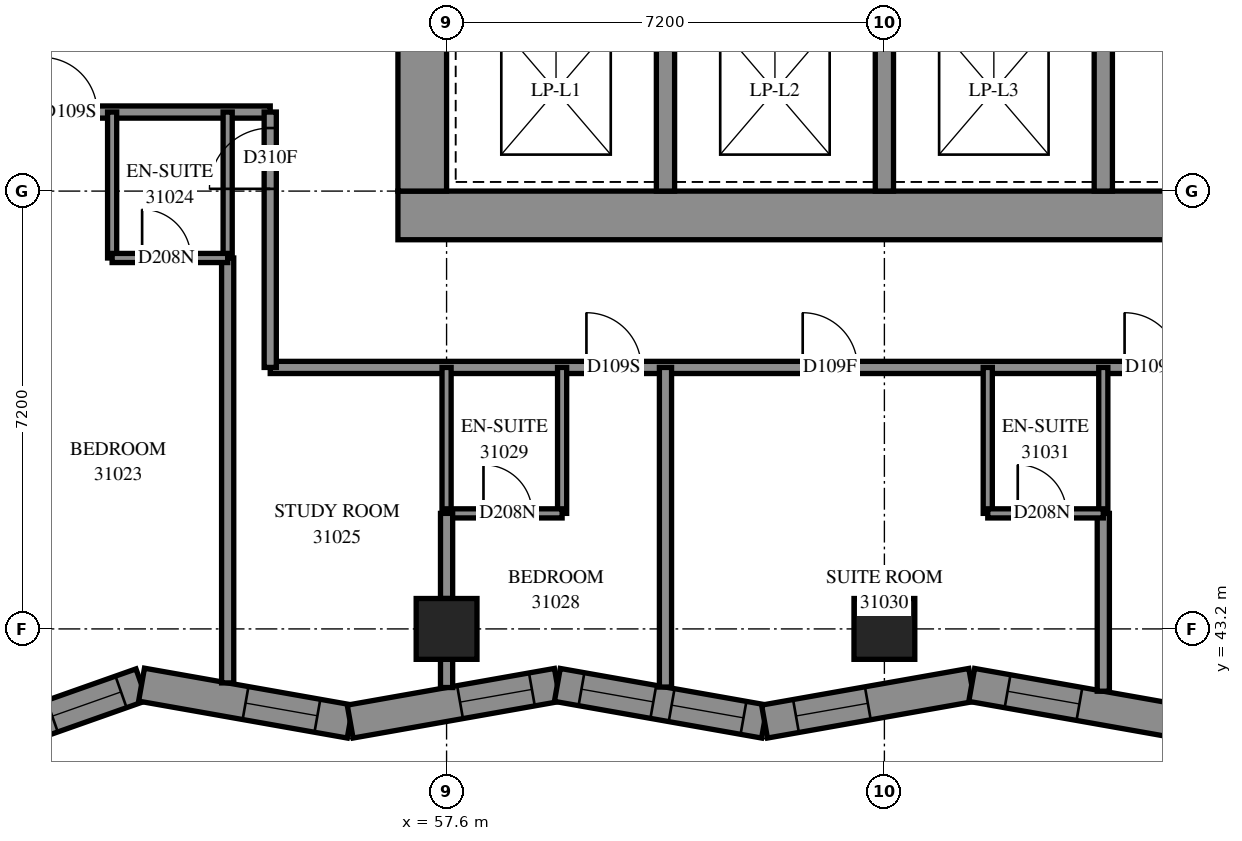
"""IFC4 building model, lengths in metres.
Left out: names, types, materials, properties, quantities, classifications, styles, units other than length and angle.
Written with IfcOpenShell. Run it as: python <this file> out.ifc"""

import sys

from ifc_helpers import new_model, si_unit, direction, frame, frame_2d, origin, origin_2d, place, context, subcontext, project, spatial, polyline, rectangle, outline, extrude, element, fill, save


model = new_model("IFC4")
c1 = context("Model", 3, precision=1e-05, world=origin(), true_north=direction((0.0, 1.0)))
c2 = subcontext(c1, "Body", "Model", "MODEL_VIEW")
j1 = project(units=[si_unit("LENGTHUNIT", "METRE"), si_unit("PLANEANGLEUNIT", "RADIAN")], contexts=[c1])
p1 = place(None, origin())
s1 = spatial("IfcSite", under=j1, at=p1, CompositionType="ELEMENT")
p2 = place(p1, origin())
s2 = spatial("IfcBuilding", under=s1, at=p2, CompositionType="ELEMENT")
p3 = place(p2, frame((0.0, 0.0, 115.2)))
s3 = spatial("IfcBuildingStorey", under=s2, at=p3, CompositionType="ELEMENT", Elevation=115.2)
for number, where, z_axis, x_axis in (
    (1, (57.6, 43.2, 0.0), (0.0, 0.0, 1.0), (1.0, 0.0, 0.0)),
    (2, (64.8, 43.2, 0.0), (0.0, 0.0, 1.0), (1.0, 0.0, 0.0)),
):
    element("IfcColumn", number, at=place(p3, frame(where, z_axis=z_axis, x_axis=x_axis)), inside=s3, PredefinedType="COLUMN", context=c2, shape_type="SweptSolid", body=[
        extrude(rectangle(XDim=1.0, YDim=1.0, at=origin_2d()), origin(), (0.0, 0.0, 1.0), 3.1),
    ])
p4 = place(p3, frame((56.8, 50.0, -0.3), z_axis=(0.0, 0.0, 1.0), x_axis=(1.0, 0.0, 0.0)))
e3 = element("IfcWall", 3, at=p4, inside=s3, PredefinedType="SHEAR", context=c2, shape_type="SweptSolid", body=[
    extrude(rectangle(XDim=16.0, YDim=0.8, at=frame_2d((8.0, 0.0))), origin(), (0.0, 0.0, 1.0), 2.7),
])
p5 = place(p3, frame((57.2, 50.4, -0.3), z_axis=(0.0, 0.0, 1.0), x_axis=(0.0, 1.0, 0.0)))
e4 = element("IfcWall", 4, at=p5, inside=s3, PredefinedType="SHEAR", context=c2, shape_type="SweptSolid", body=[
    extrude(rectangle(XDim=14.4, YDim=0.8, at=frame_2d((7.2, 0.0))), origin(), (0.0, 0.0, 1.0), 2.7),
])
p6 = place(p5, frame((4.55, 0.0, 0.3)))
e5 = element("IfcOpeningElement", 5, at=p6, cuts=e4, PredefinedType="OPENING", context=c2, shape_type="SweptSolid", body=[
    extrude(rectangle(XDim=1.1, YDim=2.1, at=frame_2d((0.55, 1.05))), frame((0.0, 0.41, 0.0), z_axis=(0.0, -1.0, 0.0), x_axis=(1.0, 0.0, 0.0)), (0.0, 0.0, 1.0), 0.82),
])
p7 = place(p5, frame((11.35, 0.0, 0.3)))
e6 = element("IfcOpeningElement", 6, at=p7, cuts=e4, PredefinedType="OPENING", context=c2, shape_type="SweptSolid", body=[
    extrude(rectangle(XDim=1.1, YDim=2.1, at=frame_2d((0.55, 1.05))), frame((0.0, 0.41, 0.0), z_axis=(0.0, -1.0, 0.0), x_axis=(1.0, 0.0, 0.0)), (0.0, 0.0, 1.0), 0.82),
])
for number, where, z_axis, x_axis in (
    (7, (61.2, 50.4, 0.0), (0.0, 0.0, 1.0), (0.0, 1.0, 0.0)),
    (8, (64.8, 50.4, 0.0), (0.0, 0.0, 1.0), (0.0, 1.0, 0.0)),
    (9, (68.4, 50.4, 0.0), (0.0, 0.0, 1.0), (0.0, 1.0, 0.0)),
):
    element("IfcWall", number, at=place(p3, frame(where, z_axis=z_axis, x_axis=x_axis)), inside=s3, PredefinedType="SOLIDWALL", context=c2, shape_type="SweptSolid", body=[
        extrude(rectangle(XDim=3.3, YDim=0.3, at=frame_2d((1.65, 0.0))), origin(), (0.0, 0.0, 1.0), 3.1),
    ])
p8 = place(p3, frame((49.475, 41.186, 0.0), z_axis=(0.0, 0.0, 1.0), x_axis=(0.9429483298, 0.3329391044, 0.0)))
e10 = element("IfcWall", 10, at=p8, inside=s3, PredefinedType="SOLIDWALL", context=c2, shape_type="SweptSolid", body=[
    extrude(outline(polyline([(-0.389, -0.275), (3.225, -0.275), (3.369, 0.275), (0.389, 0.275), (-0.389, -0.275)])), origin(), (0.0, 0.0, 1.0), 3.1),
])
p9 = place(p8, frame((1.739, 0.0, 0.5)))
e11 = element("IfcOpeningElement", 11, at=p9, cuts=e10, PredefinedType="OPENING", context=c2, shape_type="SweptSolid", body=[
    extrude(rectangle(XDim=1.2, YDim=2.45, at=frame_2d((0.6, 1.225))), frame((0.0, 0.285, 0.0), z_axis=(0.0, -1.0, 0.0), x_axis=(1.0, 0.0, 0.0)), (0.0, 0.0, 1.0), 0.57),
])
p10 = place(p3, frame((52.584, 42.283, 0.0), z_axis=(0.0, 0.0, 1.0), x_axis=(0.9846990638, -0.1742634606, 0.0)))
e12 = element("IfcWall", 12, at=p10, inside=s3, PredefinedType="SOLIDWALL", context=c2, shape_type="SweptSolid", body=[
    extrude(outline(polyline([(0.072, -0.275), (3.533, -0.275), (3.435, 0.275), (-0.072, 0.275), (0.072, -0.275)])), origin(), (0.0, 0.0, 1.0), 3.1),
])
p11 = place(p10, frame((1.737, 0.0, 0.5)))
e13 = element("IfcOpeningElement", 13, at=p11, cuts=e12, PredefinedType="OPENING", context=c2, shape_type="SweptSolid", body=[
    extrude(rectangle(XDim=1.2, YDim=2.45, at=frame_2d((0.6, 1.225))), frame((0.0, 0.285, 0.0), z_axis=(0.0, -1.0, 0.0), x_axis=(1.0, 0.0, 0.0)), (0.0, 0.0, 1.0), 0.57),
])
p12 = place(p3, frame((56.014, 41.676, 0.0), z_axis=(0.0, 0.0, 1.0), x_axis=(0.9846979018, 0.1742700266, 0.0)))
e14 = element("IfcWall", 14, at=p12, inside=s3, PredefinedType="SOLIDWALL", context=c2, shape_type="SweptSolid", body=[
    extrude(outline(polyline([(-0.049, -0.275), (3.412, -0.275), (3.509, 0.275), (0.049, 0.275), (-0.049, -0.275)])), origin(), (0.0, 0.0, 1.0), 3.1),
])
p13 = place(p12, frame((1.835, 0.0, 0.5)))
e15 = element("IfcOpeningElement", 15, at=p13, cuts=e14, PredefinedType="OPENING", context=c2, shape_type="SweptSolid", body=[
    extrude(rectangle(XDim=1.2, YDim=2.45, at=frame_2d((0.6, 1.225))), frame((0.0, 0.285, 0.0), z_axis=(0.0, -1.0, 0.0), x_axis=(1.0, 0.0, 0.0)), (0.0, 0.0, 1.0), 0.57),
])
p14 = place(p3, frame((59.422, 42.279, 0.0), z_axis=(0.0, 0.0, 1.0), x_axis=(0.9846979018, -0.1742700266, 0.0)))
e16 = element("IfcWall", 16, at=p14, inside=s3, PredefinedType="SOLIDWALL", context=c2, shape_type="SweptSolid", body=[
    extrude(outline(polyline([(0.049, -0.275), (3.509, -0.275), (3.412, 0.275), (-0.049, 0.275), (0.049, -0.275)])), origin(), (0.0, 0.0, 1.0), 3.1),
])
p15 = place(p14, frame((0.403, 0.0, 0.5)))
e17 = element("IfcOpeningElement", 17, at=p15, cuts=e16, PredefinedType="OPENING", context=c2, shape_type="SweptSolid", body=[
    extrude(rectangle(XDim=1.2, YDim=2.45, at=frame_2d((0.6, 1.225))), frame((0.0, 0.285, 0.0), z_axis=(0.0, -1.0, 0.0), x_axis=(1.0, 0.0, 0.0)), (0.0, 0.0, 1.0), 0.57),
])
p16 = place(p14, frame((1.909, 0.0, 0.5)))
e18 = element("IfcOpeningElement", 18, at=p16, cuts=e16, PredefinedType="OPENING", context=c2, shape_type="SweptSolid", body=[
    extrude(rectangle(XDim=1.2, YDim=2.45, at=frame_2d((0.6, 1.225))), frame((0.0, 0.285, 0.0), z_axis=(0.0, -1.0, 0.0), x_axis=(1.0, 0.0, 0.0)), (0.0, 0.0, 1.0), 0.57),
])
p17 = place(p3, frame((62.829, 41.676, 0.0), z_axis=(0.0, 0.0, 1.0), x_axis=(0.9846979018, 0.1742700266, 0.0)))
e19 = element("IfcWall", 19, at=p17, inside=s3, PredefinedType="SOLIDWALL", context=c2, shape_type="SweptSolid", body=[
    extrude(outline(polyline([(-0.049, -0.275), (3.412, -0.275), (3.509, 0.275), (0.049, 0.275), (-0.049, -0.275)])), origin(), (0.0, 0.0, 1.0), 3.1),
])
p18 = place(p17, frame((0.525, 0.0, 0.5)))
e20 = element("IfcOpeningElement", 20, at=p18, cuts=e19, PredefinedType="OPENING", context=c2, shape_type="SweptSolid", body=[
    extrude(rectangle(XDim=1.2, YDim=2.45, at=frame_2d((0.6, 1.225))), frame((0.0, 0.285, 0.0), z_axis=(0.0, -1.0, 0.0), x_axis=(1.0, 0.0, 0.0)), (0.0, 0.0, 1.0), 0.57),
])
p19 = place(p3, frame((66.236, 42.279, 0.0), z_axis=(0.0, 0.0, 1.0), x_axis=(0.9846979018, -0.1742700266, 0.0)))
e21 = element("IfcWall", 21, at=p19, inside=s3, PredefinedType="SOLIDWALL", context=c2, shape_type="SweptSolid", body=[
    extrude(outline(polyline([(0.049, -0.275), (3.509, -0.275), (3.412, 0.275), (-0.049, 0.275), (0.049, -0.275)])), origin(), (0.0, 0.0, 1.0), 3.1),
])
p20 = place(p19, frame((0.599, 0.0, 0.5)))
e22 = element("IfcOpeningElement", 22, at=p20, cuts=e21, PredefinedType="OPENING", context=c2, shape_type="SweptSolid", body=[
    extrude(rectangle(XDim=1.2, YDim=2.45, at=frame_2d((0.6, 1.225))), frame((0.0, 0.285, 0.0), z_axis=(0.0, -1.0, 0.0), x_axis=(1.0, 0.0, 0.0)), (0.0, 0.0, 1.0), 0.57),
])
p21 = place(p3, frame((54.7, 47.5, 0.0), z_axis=(0.0, 0.0, 1.0), x_axis=(1.0, 0.0, 0.0)))
e23 = element("IfcWall", 23, at=p21, inside=s3, PredefinedType="PARTITIONING", context=c2, shape_type="SweptSolid", body=[
    extrude(rectangle(XDim=19.442, YDim=0.2, at=frame_2d((9.721, 0.0))), origin(), (0.0, 0.0, 1.0), 3.1),
])
p22 = place(p21, frame((5.2, 0.0, 0.0)))
e24 = element("IfcOpeningElement", 24, at=p22, cuts=e23, PredefinedType="OPENING", context=c2, shape_type="SweptSolid", body=[
    extrude(rectangle(XDim=0.9, YDim=2.1, at=frame_2d((0.45, 1.05))), frame((0.0, 0.11, 0.0), z_axis=(0.0, -1.0, 0.0), x_axis=(1.0, 0.0, 0.0)), (0.0, 0.0, 1.0), 0.22),
])
p23 = place(p21, frame((8.757, 0.0, 0.0)))
e25 = element("IfcOpeningElement", 25, at=p23, cuts=e23, PredefinedType="OPENING", context=c2, shape_type="SweptSolid", body=[
    extrude(rectangle(XDim=0.9, YDim=2.1, at=frame_2d((0.45, 1.05))), frame((0.0, 0.11, 0.0), z_axis=(0.0, -1.0, 0.0), x_axis=(1.0, 0.0, 0.0)), (0.0, 0.0, 1.0), 0.22),
])
p24 = place(p21, frame((14.05, 0.0, 0.0)))
e26 = element("IfcOpeningElement", 26, at=p24, cuts=e23, PredefinedType="OPENING", context=c2, shape_type="SweptSolid", body=[
    extrude(rectangle(XDim=0.9, YDim=2.1, at=frame_2d((0.45, 1.05))), frame((0.0, 0.11, 0.0), z_axis=(0.0, -1.0, 0.0), x_axis=(1.0, 0.0, 0.0)), (0.0, 0.0, 1.0), 0.22),
])
p25 = place(p3, frame((54.0, 42.312, 0.0), z_axis=(0.0, 0.0, 1.0), x_axis=(0.0, 1.0, 0.0)))
e27 = element("IfcWall", 27, at=p25, inside=s3, PredefinedType="PARTITIONING", context=c2, shape_type="SweptSolid", body=[
    extrude(rectangle(XDim=6.988, YDim=0.2, at=frame_2d((3.494, 0.0))), origin(), (0.0, 0.0, 1.0), 3.1),
])
p26 = place(p3, frame((61.2, 42.244, 0.0), z_axis=(0.0, 0.0, 1.0), x_axis=(0.0, 1.0, 0.0)))
e28 = element("IfcWall", 28, at=p26, inside=s3, PredefinedType="PARTITIONING", context=c2, shape_type="SweptSolid", body=[
    extrude(rectangle(XDim=5.256, YDim=0.2, at=frame_2d((2.628, 0.0))), origin(), (0.0, 0.0, 1.0), 3.1),
])
p27 = place(p3, frame((50.4, 51.7, 0.0), z_axis=(0.0, 0.0, 1.0), x_axis=(1.0, 0.0, 0.0)))
e29 = element("IfcWall", 29, at=p27, inside=s3, PredefinedType="PARTITIONING", context=c2, shape_type="SweptSolid", body=[
    extrude(rectangle(XDim=4.3, YDim=0.2, at=frame_2d((2.15, 0.0))), origin(), (0.0, 0.0, 1.0), 3.1),
])
p28 = place(p27, frame((0.552, 0.0, 0.0)))
e30 = element("IfcOpeningElement", 30, at=p28, cuts=e29, PredefinedType="OPENING", context=c2, shape_type="SweptSolid", body=[
    extrude(rectangle(XDim=0.9, YDim=2.1, at=frame_2d((0.45, 1.05))), frame((0.0, 0.11, 0.0), z_axis=(0.0, -1.0, 0.0), x_axis=(1.0, 0.0, 0.0)), (0.0, 0.0, 1.0), 0.22),
])
p29 = place(p3, frame((54.7, 47.5, 0.0), z_axis=(0.0, 0.0, 1.0), x_axis=(0.0, 1.0, 0.0)))
e31 = element("IfcWall", 31, at=p29, inside=s3, PredefinedType="PARTITIONING", context=c2, shape_type="SweptSolid", body=[
    extrude(rectangle(XDim=4.2, YDim=0.2, at=frame_2d((2.1, 0.0))), origin(), (0.0, 0.0, 1.0), 3.1),
])
p30 = place(p29, frame((2.937, 0.0, 0.0)))
e32 = element("IfcOpeningElement", 32, at=p30, cuts=e31, PredefinedType="OPENING", context=c2, shape_type="SweptSolid", body=[
    extrude(rectangle(XDim=1.0, YDim=2.1, at=frame_2d((0.5, 1.05))), frame((0.0, 0.11, 0.0), z_axis=(0.0, -1.0, 0.0), x_axis=(1.0, 0.0, 0.0)), (0.0, 0.0, 1.0), 0.22),
])
p31 = place(p3, frame((68.4, 42.176, 0.0), z_axis=(0.0, 0.0, 1.0), x_axis=(0.0, 1.0, 0.0)))
e33 = element("IfcWall", 33, at=p31, inside=s3, PredefinedType="PARTITIONING", context=c2, shape_type="SweptSolid", body=[
    extrude(rectangle(XDim=2.924, YDim=0.2, at=frame_2d((1.462, 0.0))), origin(), (0.0, 0.0, 1.0), 3.1),
])
for number, where, z_axis, x_axis in (
    (34, (52.1, 49.3, 0.0), (0.0, 0.0, 1.0), (0.0, 1.0, 0.0)),
    (35, (54.0, 49.3, 0.0), (0.0, 0.0, 1.0), (0.0, 1.0, 0.0)),
    (36, (59.5, 45.1, 0.0), (0.0, 0.0, 1.0), (0.0, 1.0, 0.0)),
    (37, (57.6, 45.1, 0.0), (0.0, 0.0, 1.0), (0.0, 1.0, 0.0)),
    (38, (66.5, 45.1, 0.0), (0.0, 0.0, 1.0), (0.0, 1.0, 0.0)),
    (39, (68.4, 45.1, 0.0), (0.0, 0.0, 1.0), (0.0, 1.0, 0.0)),
):
    element("IfcWall", number, at=place(p3, frame(where, z_axis=z_axis, x_axis=x_axis)), inside=s3, PredefinedType="PARTITIONING", context=c2, shape_type="SweptSolid", body=[
        extrude(rectangle(XDim=2.4, YDim=0.15, at=frame_2d((1.2, 0.0))), origin(), (0.0, 0.0, 1.0), 3.1),
    ])
p32 = place(p3, frame((66.5, 45.1, 0.0), z_axis=(0.0, 0.0, 1.0), x_axis=(1.0, 0.0, 0.0)))
e40 = element("IfcWall", 40, at=p32, inside=s3, PredefinedType="PARTITIONING", context=c2, shape_type="SweptSolid", body=[
    extrude(rectangle(XDim=1.9, YDim=0.15, at=frame_2d((0.95, 0.0))), origin(), (0.0, 0.0, 1.0), 3.1),
])
p33 = place(p32, frame((0.493, 0.0, 0.0)))
e41 = element("IfcOpeningElement", 41, at=p33, cuts=e40, PredefinedType="OPENING", context=c2, shape_type="SweptSolid", body=[
    extrude(rectangle(XDim=0.8, YDim=2.1, at=frame_2d((0.4, 1.05))), frame((0.0, 0.085, 0.0), z_axis=(0.0, -1.0, 0.0), x_axis=(1.0, 0.0, 0.0)), (0.0, 0.0, 1.0), 0.17),
])
p34 = place(p3, frame((52.1, 49.3, 0.0), z_axis=(0.0, 0.0, 1.0), x_axis=(1.0, 0.0, 0.0)))
e42 = element("IfcWall", 42, at=p34, inside=s3, PredefinedType="PARTITIONING", context=c2, shape_type="SweptSolid", body=[
    extrude(rectangle(XDim=1.9, YDim=0.15, at=frame_2d((0.95, 0.0))), origin(), (0.0, 0.0, 1.0), 3.1),
])
p35 = place(p34, frame((0.493, 0.0, 0.0)))
e43 = element("IfcOpeningElement", 43, at=p35, cuts=e42, PredefinedType="OPENING", context=c2, shape_type="SweptSolid", body=[
    extrude(rectangle(XDim=0.8, YDim=2.1, at=frame_2d((0.4, 1.05))), frame((0.0, 0.085, 0.0), z_axis=(0.0, -1.0, 0.0), x_axis=(1.0, 0.0, 0.0)), (0.0, 0.0, 1.0), 0.17),
])
p36 = place(p3, frame((57.6, 45.1, 0.0), z_axis=(0.0, 0.0, 1.0), x_axis=(1.0, 0.0, 0.0)))
e44 = element("IfcWall", 44, at=p36, inside=s3, PredefinedType="PARTITIONING", context=c2, shape_type="SweptSolid", body=[
    extrude(rectangle(XDim=1.9, YDim=0.15, at=frame_2d((0.95, 0.0))), origin(), (0.0, 0.0, 1.0), 3.1),
])
p37 = place(p36, frame((0.607, 0.0, 0.0)))
e45 = element("IfcOpeningElement", 45, at=p37, cuts=e44, PredefinedType="OPENING", context=c2, shape_type="SweptSolid", body=[
    extrude(rectangle(XDim=0.8, YDim=2.1, at=frame_2d((0.4, 1.05))), frame((0.0, 0.085, 0.0), z_axis=(0.0, -1.0, 0.0), x_axis=(1.0, 0.0, 0.0)), (0.0, 0.0, 1.0), 0.17),
])
p38 = place(p3, frame((57.6, 43.7, 0.0), z_axis=(0.0, 0.0, 1.0), x_axis=(0.0, 1.0, 0.0)))
e46 = element("IfcWall", 46, at=p38, inside=s3, PredefinedType="PARTITIONING", context=c2, shape_type="SweptSolid", body=[
    extrude(rectangle(XDim=1.4, YDim=0.2, at=frame_2d((0.7, 0.0))), origin(), (0.0, 0.0, 1.0), 3.1),
])
p39 = place(p3, frame((57.6, 42.236, 0.0), z_axis=(0.0, 0.0, 1.0), x_axis=(0.0, 1.0, 0.0)))
e47 = element("IfcWall", 47, at=p39, inside=s3, PredefinedType="PARTITIONING", context=c2, shape_type="SweptSolid", body=[
    extrude(rectangle(XDim=0.464, YDim=0.2, at=frame_2d((0.232, 0.0))), origin(), (0.0, 0.0, 1.0), 3.1),
])
p40 = place(p9, origin())
e48 = element("IfcWindow", 48, at=p40, inside=s3, PartitioningType="SINGLE_PANEL", PredefinedType="WINDOW", context=c2, shape_type="SweptSolid", body=[
    extrude(rectangle(XDim=1.2, YDim=2.45, at=frame_2d((0.6, 1.225))), frame((0.0, 0.155, 0.0), z_axis=(0.0, -1.0, 0.0), x_axis=(1.0, 0.0, 0.0)), (0.0, 0.0, 1.0), 0.06),
])
fill(e11, e48)
p41 = place(p11, origin())
e49 = element("IfcWindow", 49, at=p41, inside=s3, PartitioningType="SINGLE_PANEL", PredefinedType="WINDOW", context=c2, shape_type="SweptSolid", body=[
    extrude(rectangle(XDim=1.2, YDim=2.45, at=frame_2d((0.6, 1.225))), frame((0.0, 0.155, 0.0), z_axis=(0.0, -1.0, 0.0), x_axis=(1.0, 0.0, 0.0)), (0.0, 0.0, 1.0), 0.06),
])
fill(e13, e49)
p42 = place(p13, origin())
e50 = element("IfcWindow", 50, at=p42, inside=s3, PartitioningType="SINGLE_PANEL", PredefinedType="WINDOW", context=c2, shape_type="SweptSolid", body=[
    extrude(rectangle(XDim=1.2, YDim=2.45, at=frame_2d((0.6, 1.225))), frame((0.0, 0.155, 0.0), z_axis=(0.0, -1.0, 0.0), x_axis=(1.0, 0.0, 0.0)), (0.0, 0.0, 1.0), 0.06),
])
fill(e15, e50)
p43 = place(p15, origin())
e51 = element("IfcWindow", 51, at=p43, inside=s3, PartitioningType="SINGLE_PANEL", PredefinedType="WINDOW", context=c2, shape_type="SweptSolid", body=[
    extrude(rectangle(XDim=1.2, YDim=2.45, at=frame_2d((0.6, 1.225))), frame((0.0, 0.155, 0.0), z_axis=(0.0, -1.0, 0.0), x_axis=(1.0, 0.0, 0.0)), (0.0, 0.0, 1.0), 0.06),
])
fill(e17, e51)
p44 = place(p16, origin())
e52 = element("IfcWindow", 52, at=p44, inside=s3, PartitioningType="SINGLE_PANEL", PredefinedType="WINDOW", context=c2, shape_type="SweptSolid", body=[
    extrude(rectangle(XDim=1.2, YDim=2.45, at=frame_2d((0.6, 1.225))), frame((0.0, 0.155, 0.0), z_axis=(0.0, -1.0, 0.0), x_axis=(1.0, 0.0, 0.0)), (0.0, 0.0, 1.0), 0.06),
])
fill(e18, e52)
p45 = place(p18, origin())
e53 = element("IfcWindow", 53, at=p45, inside=s3, PartitioningType="SINGLE_PANEL", PredefinedType="WINDOW", context=c2, shape_type="SweptSolid", body=[
    extrude(rectangle(XDim=1.2, YDim=2.45, at=frame_2d((0.6, 1.225))), frame((0.0, 0.155, 0.0), z_axis=(0.0, -1.0, 0.0), x_axis=(1.0, 0.0, 0.0)), (0.0, 0.0, 1.0), 0.06),
])
fill(e20, e53)
p46 = place(p20, origin())
e54 = element("IfcWindow", 54, at=p46, inside=s3, PartitioningType="SINGLE_PANEL", PredefinedType="WINDOW", context=c2, shape_type="SweptSolid", body=[
    extrude(rectangle(XDim=1.2, YDim=2.45, at=frame_2d((0.6, 1.225))), frame((0.0, 0.155, 0.0), z_axis=(0.0, -1.0, 0.0), x_axis=(1.0, 0.0, 0.0)), (0.0, 0.0, 1.0), 0.06),
])
fill(e22, e54)
p47 = place(p28, origin())
e55 = element("IfcDoor", 55, at=p47, inside=s3, OperationType="SINGLE_SWING_LEFT", PredefinedType="DOOR", context=c2, shape_type="SweptSolid", body=[
    extrude(rectangle(XDim=0.9, YDim=2.1, at=frame_2d((0.45, 1.05))), frame((0.0, 0.025, 0.0), z_axis=(0.0, -1.0, 0.0), x_axis=(1.0, 0.0, 0.0)), (0.0, 0.0, 1.0), 0.05),
])
fill(e30, e55)
p48 = place(p35, origin())
e56 = element("IfcDoor", 56, at=p48, inside=s3, OperationType="SINGLE_SWING_RIGHT", PredefinedType="DOOR", context=c2, shape_type="SweptSolid", body=[
    extrude(rectangle(XDim=0.8, YDim=2.1, at=frame_2d((0.4, 1.05))), frame((0.0, 0.025, 0.0), z_axis=(0.0, -1.0, 0.0), x_axis=(1.0, 0.0, 0.0)), (0.0, 0.0, 1.0), 0.05),
])
fill(e43, e56)
p49 = place(p30, origin())
e57 = element("IfcDoor", 57, at=p49, inside=s3, OperationType="SINGLE_SWING_RIGHT", PredefinedType="DOOR", context=c2, shape_type="SweptSolid", body=[
    extrude(rectangle(XDim=1.0, YDim=2.1, at=frame_2d((0.5, 1.05))), frame((0.0, 0.025, 0.0), z_axis=(0.0, -1.0, 0.0), x_axis=(1.0, 0.0, 0.0)), (0.0, 0.0, 1.0), 0.05),
])
fill(e32, e57)
p50 = place(p22, origin())
e58 = element("IfcDoor", 58, at=p50, inside=s3, OperationType="SINGLE_SWING_LEFT", PredefinedType="DOOR", context=c2, shape_type="SweptSolid", body=[
    extrude(rectangle(XDim=0.9, YDim=2.1, at=frame_2d((0.45, 1.05))), frame((0.0, 0.025, 0.0), z_axis=(0.0, -1.0, 0.0), x_axis=(1.0, 0.0, 0.0)), (0.0, 0.0, 1.0), 0.05),
])
fill(e24, e58)
p51 = place(p37, origin())
e59 = element("IfcDoor", 59, at=p51, inside=s3, OperationType="SINGLE_SWING_RIGHT", PredefinedType="DOOR", context=c2, shape_type="SweptSolid", body=[
    extrude(rectangle(XDim=0.8, YDim=2.1, at=frame_2d((0.4, 1.05))), frame((0.0, 0.025, 0.0), z_axis=(0.0, -1.0, 0.0), x_axis=(1.0, 0.0, 0.0)), (0.0, 0.0, 1.0), 0.05),
])
fill(e45, e59)
p52 = place(p23, origin())
e60 = element("IfcDoor", 60, at=p52, inside=s3, OperationType="SINGLE_SWING_RIGHT", PredefinedType="DOOR", context=c2, shape_type="SweptSolid", body=[
    extrude(rectangle(XDim=0.9, YDim=2.1, at=frame_2d((0.45, 1.05))), frame((0.0, 0.025, 0.0), z_axis=(0.0, -1.0, 0.0), x_axis=(1.0, 0.0, 0.0)), (0.0, 0.0, 1.0), 0.05),
])
fill(e25, e60)
p53 = place(p33, origin())
e61 = element("IfcDoor", 61, at=p53, inside=s3, OperationType="SINGLE_SWING_RIGHT", PredefinedType="DOOR", context=c2, shape_type="SweptSolid", body=[
    extrude(rectangle(XDim=0.8, YDim=2.1, at=frame_2d((0.4, 1.05))), frame((0.0, 0.025, 0.0), z_axis=(0.0, -1.0, 0.0), x_axis=(1.0, 0.0, 0.0)), (0.0, 0.0, 1.0), 0.05),
])
fill(e41, e61)
p54 = place(p24, origin())
e62 = element("IfcDoor", 62, at=p54, inside=s3, OperationType="SINGLE_SWING_RIGHT", PredefinedType="DOOR", context=c2, shape_type="SweptSolid", body=[
    extrude(rectangle(XDim=0.9, YDim=2.1, at=frame_2d((0.45, 1.05))), frame((0.0, 0.025, 0.0), z_axis=(0.0, -1.0, 0.0), x_axis=(1.0, 0.0, 0.0)), (0.0, 0.0, 1.0), 0.05),
])
fill(e26, e62)
save(model, sys.argv[1])
